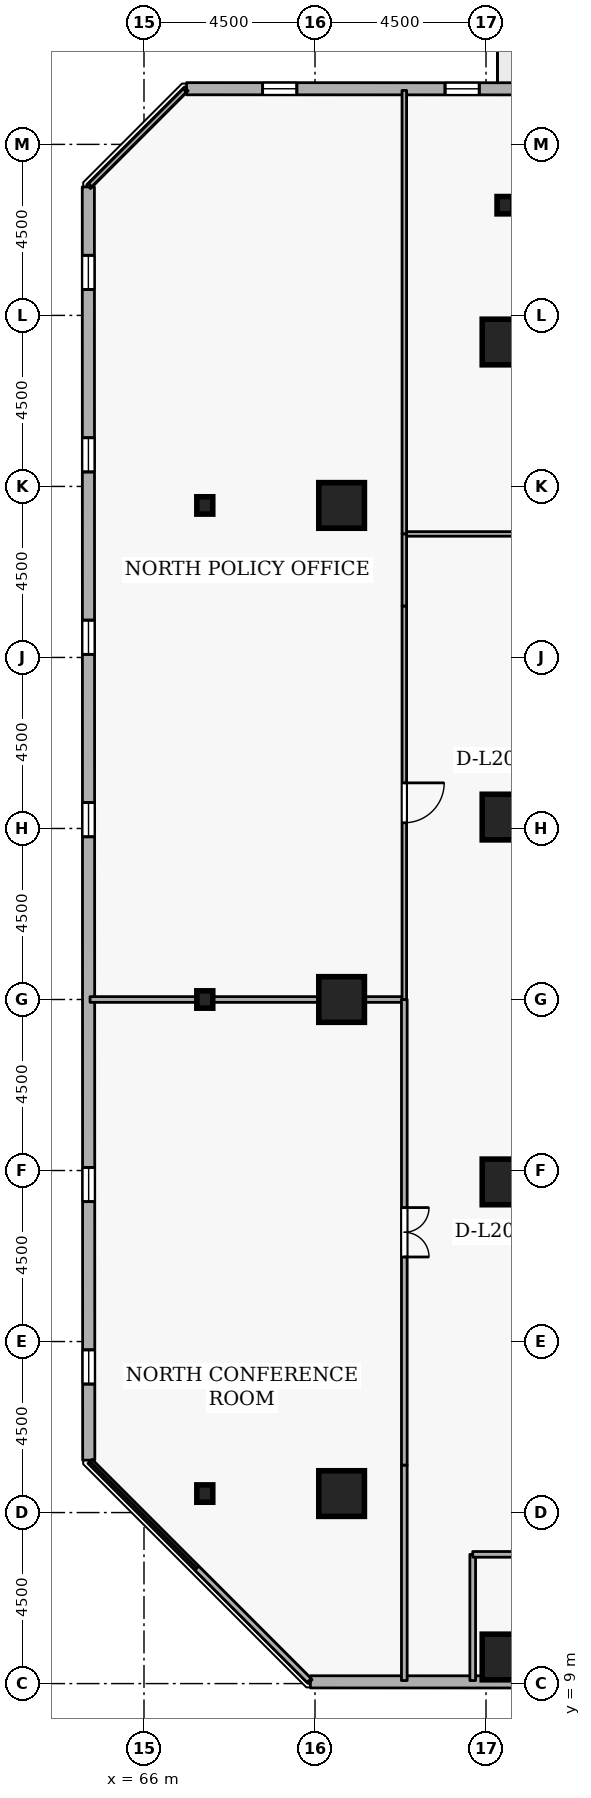
"""IFC4 building model, lengths in metres.
Left out: names, types, materials, properties, quantities, classifications, styles, units other than length and angle.
Written with IfcOpenShell. Run it as: python <this file> out.ifc"""

import sys

from ifc_helpers import new_model, si_unit, direction, frame, frame_2d, origin, origin_2d, place, context, subcontext, project, spatial, rectangle, i_section, extrude, element, fill, save


model = new_model("IFC4")
c1 = context("Model", 3, precision=1e-05, world=origin(), true_north=direction((0.0, 1.0)))
c2 = subcontext(c1, "Body", "Model", "MODEL_VIEW")
j1 = project(units=[si_unit("LENGTHUNIT", "METRE"), si_unit("PLANEANGLEUNIT", "RADIAN")], contexts=[c1])
p1 = place(None, origin())
s1 = spatial("IfcSite", under=j1, at=p1, CompositionType="ELEMENT")
p2 = place(p1, origin())
s2 = spatial("IfcBuilding", under=s1, at=p2, CompositionType="ELEMENT")
p3 = place(p2, frame((0.0, 0.0, 80.1)))
s3 = spatial("IfcBuildingStorey", under=s2, at=p3, CompositionType="ELEMENT", Elevation=80.1)
for number, where, z_axis, x_axis in (
    (1, (75.5, 44.3, 0.0), (0.0, 0.0, 1.0), (1.0, 0.0, 0.0)),
    (2, (71.2, 14.0, 0.0), (0.0, 0.0, 1.0), (1.0, 0.0, 0.0)),
    (3, (71.2, 27.0, 0.0), (0.0, 0.0, 1.0), (1.0, 0.0, 0.0)),
    (4, (71.2, 40.0, 0.0), (0.0, 0.0, 1.0), (1.0, 0.0, 0.0)),
    (5, (75.5, 9.7, 0.0), (0.0, 0.0, 1.0), (1.0, 0.0, 0.0)),
    (6, (75.5, 22.2, 0.0), (0.0, 0.0, 1.0), (1.0, 0.0, 0.0)),
    (7, (75.5, 31.8, 0.0), (0.0, 0.0, 1.0), (1.0, 0.0, 0.0)),
):
    element("IfcColumn", number, at=place(p3, frame(where, z_axis=z_axis, x_axis=x_axis)), inside=s3, PredefinedType="COLUMN", context=c2, shape_type="SweptSolid", body=[
        extrude(rectangle(XDim=1.2, YDim=1.2, at=origin_2d()), origin(), (0.0, 0.0, 1.0), 3.6),
    ])
for number, where, z_axis, x_axis in (
    (8, (75.5, 47.9, 0.0), (0.0, 0.0, 1.0), (1.0, 0.0, 0.0)),
    (9, (67.6, 14.0, 0.0), (0.0, 0.0, 1.0), (1.0, 0.0, 0.0)),
    (10, (67.6, 27.0, 0.0), (0.0, 0.0, 1.0), (1.0, 0.0, 0.0)),
    (11, (67.6, 40.0, 0.0), (0.0, 0.0, 1.0), (1.0, 0.0, 0.0)),
):
    element("IfcColumn", number, at=place(p3, frame(where, z_axis=z_axis, x_axis=x_axis)), inside=s3, PredefinedType="COLUMN", context=c2, shape_type="SweptSolid", body=[
        extrude(i_section(OverallWidth=0.418, OverallDepth=0.456, WebThickness=0.042, FlangeThickness=0.067, FilletRadius=0.015, at=origin_2d()), origin(), (0.0, 0.0, 1.0), 3.6),
    ])
p4 = place(p3, frame((70.378, 9.046, 0.0), z_axis=(0.0, 0.0, 1.0), x_axis=(0.999999950907, -0.000313347115, 0.0)))
e12 = element("IfcWall", 12, at=p4, inside=s3, PredefinedType="STANDARD", context=c2, shape_type="SweptSolid", body=[
    extrude(rectangle(XDim=33.503, YDim=0.32, at=frame_2d((16.751, 0.0))), origin(), (0.0, 0.0, 1.0), 2.7),
])
p5 = place(p4, frame((6.6, 0.0, 0.72)))
e13 = element("IfcOpeningElement", 13, at=p5, cuts=e12, PredefinedType="OPENING", context=c2, shape_type="SweptSolid", body=[
    extrude(rectangle(XDim=0.9, YDim=1.75, at=frame_2d((0.45, 0.875))), frame((0.0, 0.17, 0.0), z_axis=(0.0, -1.0, 0.0), x_axis=(1.0, 0.0, 0.0)), (0.0, 0.0, 1.0), 0.34),
])
p6 = place(p4, frame((11.4, 0.0, 0.72)))
e14 = element("IfcOpeningElement", 14, at=p6, cuts=e12, PredefinedType="OPENING", context=c2, shape_type="SweptSolid", body=[
    extrude(rectangle(XDim=0.9, YDim=1.75, at=frame_2d((0.45, 0.875))), frame((0.0, 0.17, 0.0), z_axis=(0.0, -1.0, 0.0), x_axis=(1.0, 0.0, 0.0)), (0.0, 0.0, 1.0), 0.34),
])
p7 = place(p4, frame((21.0, 0.0, 0.72)))
e15 = element("IfcOpeningElement", 15, at=p7, cuts=e12, PredefinedType="OPENING", context=c2, shape_type="SweptSolid", body=[
    extrude(rectangle(XDim=0.9, YDim=1.75, at=frame_2d((0.45, 0.875))), frame((0.0, 0.17, 0.0), z_axis=(0.0, -1.0, 0.0), x_axis=(1.0, 0.0, 0.0)), (0.0, 0.0, 1.0), 0.34),
])
p8 = place(p4, frame((25.8, 0.0, 0.72)))
e16 = element("IfcOpeningElement", 16, at=p8, cuts=e12, PredefinedType="OPENING", context=c2, shape_type="SweptSolid", body=[
    extrude(rectangle(XDim=0.9, YDim=1.75, at=frame_2d((0.45, 0.875))), frame((0.0, 0.17, 0.0), z_axis=(0.0, -1.0, 0.0), x_axis=(1.0, 0.0, 0.0)), (0.0, 0.0, 1.0), 0.34),
])
p9 = place(p3, frame((100.622, 50.954, 0.0), z_axis=(0.0, 0.0, 1.0), x_axis=(-0.999999950907, 0.000313347115, 0.0)))
e17 = element("IfcWall", 17, at=p9, inside=s3, PredefinedType="STANDARD", context=c2, shape_type="SweptSolid", body=[
    extrude(rectangle(XDim=33.503, YDim=0.32, at=frame_2d((16.751, 0.0))), origin(), (0.0, 0.0, 1.0), 2.7),
])
p10 = place(p9, frame((18.552, 0.0, 0.0)))
e18 = element("IfcOpeningElement", 18, at=p10, cuts=e17, PredefinedType="OPENING", context=c2, shape_type="SweptSolid", body=[
    extrude(rectangle(XDim=1.0, YDim=2.08, at=frame_2d((0.5, 1.04))), frame((0.0, 0.17, 0.0), z_axis=(0.0, -1.0, 0.0), x_axis=(1.0, 0.0, 0.0)), (0.0, 0.0, 1.0), 0.34),
])
p11 = place(p9, frame((1.8, 0.0, 0.72)))
e19 = element("IfcOpeningElement", 19, at=p11, cuts=e17, PredefinedType="OPENING", context=c2, shape_type="SweptSolid", body=[
    extrude(rectangle(XDim=0.9, YDim=1.75, at=frame_2d((0.45, 0.875))), frame((0.0, 0.17, 0.0), z_axis=(0.0, -1.0, 0.0), x_axis=(1.0, 0.0, 0.0)), (0.0, 0.0, 1.0), 0.34),
])
p12 = place(p9, frame((6.6, 0.0, 0.72)))
e20 = element("IfcOpeningElement", 20, at=p12, cuts=e17, PredefinedType="OPENING", context=c2, shape_type="SweptSolid", body=[
    extrude(rectangle(XDim=0.9, YDim=1.75, at=frame_2d((0.45, 0.875))), frame((0.0, 0.17, 0.0), z_axis=(0.0, -1.0, 0.0), x_axis=(1.0, 0.0, 0.0)), (0.0, 0.0, 1.0), 0.34),
])
p13 = place(p9, frame((16.2, 0.0, 0.72)))
e21 = element("IfcOpeningElement", 21, at=p13, cuts=e17, PredefinedType="OPENING", context=c2, shape_type="SweptSolid", body=[
    extrude(rectangle(XDim=0.9, YDim=1.75, at=frame_2d((0.45, 0.875))), frame((0.0, 0.17, 0.0), z_axis=(0.0, -1.0, 0.0), x_axis=(1.0, 0.0, 0.0)), (0.0, 0.0, 1.0), 0.34),
])
p14 = place(p9, frame((21.0, 0.0, 0.72)))
e22 = element("IfcOpeningElement", 22, at=p14, cuts=e17, PredefinedType="OPENING", context=c2, shape_type="SweptSolid", body=[
    extrude(rectangle(XDim=0.9, YDim=1.75, at=frame_2d((0.45, 0.875))), frame((0.0, 0.17, 0.0), z_axis=(0.0, -1.0, 0.0), x_axis=(1.0, 0.0, 0.0)), (0.0, 0.0, 1.0), 0.34),
])
p15 = place(p9, frame((25.8, 0.0, 0.72)))
e23 = element("IfcOpeningElement", 23, at=p15, cuts=e17, PredefinedType="OPENING", context=c2, shape_type="SweptSolid", body=[
    extrude(rectangle(XDim=0.9, YDim=1.75, at=frame_2d((0.45, 0.875))), frame((0.0, 0.17, 0.0), z_axis=(0.0, -1.0, 0.0), x_axis=(1.0, 0.0, 0.0)), (0.0, 0.0, 1.0), 0.34),
])
p16 = place(p9, frame((30.6, 0.0, 0.72)))
e24 = element("IfcOpeningElement", 24, at=p16, cuts=e17, PredefinedType="OPENING", context=c2, shape_type="SweptSolid", body=[
    extrude(rectangle(XDim=0.9, YDim=1.75, at=frame_2d((0.45, 0.875))), frame((0.0, 0.17, 0.0), z_axis=(0.0, -1.0, 0.0), x_axis=(1.0, 0.0, 0.0)), (0.0, 0.0, 1.0), 0.34),
])
p17 = place(p3, frame((64.535, 48.381, 0.0), z_axis=(0.0, 0.0, 1.0), x_axis=(0.000313347115, -0.999999950907, 0.0)))
e25 = element("IfcWall", 25, at=p17, inside=s3, PredefinedType="STANDARD", context=c2, shape_type="SweptSolid", body=[
    extrude(rectangle(XDim=33.503, YDim=0.32, at=frame_2d((16.751, 0.0))), origin(), (0.0, 0.0, 1.0), 2.7),
])
p18 = place(p17, frame((1.8, 0.0, 0.72)))
e26 = element("IfcOpeningElement", 26, at=p18, cuts=e25, PredefinedType="OPENING", context=c2, shape_type="SweptSolid", body=[
    extrude(rectangle(XDim=0.9, YDim=1.75, at=frame_2d((0.45, 0.875))), frame((0.0, 0.17, 0.0), z_axis=(0.0, -1.0, 0.0), x_axis=(1.0, 0.0, 0.0)), (0.0, 0.0, 1.0), 0.34),
])
p19 = place(p17, frame((6.6, 0.0, 0.72)))
e27 = element("IfcOpeningElement", 27, at=p19, cuts=e25, PredefinedType="OPENING", context=c2, shape_type="SweptSolid", body=[
    extrude(rectangle(XDim=0.9, YDim=1.75, at=frame_2d((0.45, 0.875))), frame((0.0, 0.17, 0.0), z_axis=(0.0, -1.0, 0.0), x_axis=(1.0, 0.0, 0.0)), (0.0, 0.0, 1.0), 0.34),
])
p20 = place(p17, frame((11.4, 0.0, 0.72)))
e28 = element("IfcOpeningElement", 28, at=p20, cuts=e25, PredefinedType="OPENING", context=c2, shape_type="SweptSolid", body=[
    extrude(rectangle(XDim=0.9, YDim=1.75, at=frame_2d((0.45, 0.875))), frame((0.0, 0.17, 0.0), z_axis=(0.0, -1.0, 0.0), x_axis=(1.0, 0.0, 0.0)), (0.0, 0.0, 1.0), 0.34),
])
p21 = place(p17, frame((16.2, 0.0, 0.72)))
e29 = element("IfcOpeningElement", 29, at=p21, cuts=e25, PredefinedType="OPENING", context=c2, shape_type="SweptSolid", body=[
    extrude(rectangle(XDim=0.9, YDim=1.75, at=frame_2d((0.45, 0.875))), frame((0.0, 0.17, 0.0), z_axis=(0.0, -1.0, 0.0), x_axis=(1.0, 0.0, 0.0)), (0.0, 0.0, 1.0), 0.34),
])
p22 = place(p17, frame((25.8, 0.0, 0.72)))
e30 = element("IfcOpeningElement", 30, at=p22, cuts=e25, PredefinedType="OPENING", context=c2, shape_type="SweptSolid", body=[
    extrude(rectangle(XDim=0.9, YDim=1.75, at=frame_2d((0.45, 0.875))), frame((0.0, 0.17, 0.0), z_axis=(0.0, -1.0, 0.0), x_axis=(1.0, 0.0, 0.0)), (0.0, 0.0, 1.0), 0.34),
])
p23 = place(p17, frame((30.6, 0.0, 0.72)))
e31 = element("IfcOpeningElement", 31, at=p23, cuts=e25, PredefinedType="OPENING", context=c2, shape_type="SweptSolid", body=[
    extrude(rectangle(XDim=0.9, YDim=1.75, at=frame_2d((0.45, 0.875))), frame((0.0, 0.17, 0.0), z_axis=(0.0, -1.0, 0.0), x_axis=(1.0, 0.0, 0.0)), (0.0, 0.0, 1.0), 0.34),
])
p24 = place(p3, frame((74.65, 9.08, 0.0), z_axis=(0.0, 0.0, 1.0), x_axis=(0.0, 1.0, 0.0)))
e32 = element("IfcWall", 32, at=p24, inside=s3, PredefinedType="PARTITIONING", context=c2, shape_type="SweptSolid", body=[
    extrude(rectangle(XDim=3.32, YDim=0.15, at=frame_2d((1.66, 0.0))), origin(), (0.0, 0.0, 1.0), 3.34),
])
p25 = place(p3, frame((74.65, 12.4, 0.0), z_axis=(0.0, 0.0, 1.0), x_axis=(1.0, 0.0, 0.0)))
e33 = element("IfcWall", 33, at=p25, inside=s3, PredefinedType="PARTITIONING", context=c2, shape_type="SweptSolid", body=[
    extrude(rectangle(XDim=4.802, YDim=0.15, at=frame_2d((2.401, 0.0))), origin(), (0.0, 0.0, 1.0), 3.34),
])
p26 = place(p3, frame((82.2, 39.25, 0.0), z_axis=(0.0, 0.0, 1.0), x_axis=(-1.0, 0.0, 0.0)))
e34 = element("IfcWall", 34, at=p26, inside=s3, PredefinedType="PARTITIONING", context=c2, shape_type="SweptSolid", body=[
    extrude(rectangle(XDim=9.35, YDim=0.12, at=frame_2d((4.675, 0.0))), origin(), (0.0, 0.0, 1.0), 3.34),
])
p27 = place(p26, frame((4.15, 0.0, 0.0)))
e35 = element("IfcOpeningElement", 35, at=p27, cuts=e34, PredefinedType="OPENING", context=c2, shape_type="SweptSolid", body=[
    extrude(rectangle(XDim=1.05, YDim=2.1, at=frame_2d((0.525, 1.05))), frame((0.0, 0.07, 0.0), z_axis=(0.0, -1.0, 0.0), x_axis=(1.0, 0.0, 0.0)), (0.0, 0.0, 1.0), 0.14),
])
p28 = place(p3, frame((72.85, 39.25, 0.0), z_axis=(0.0, 0.0, 1.0), x_axis=(0.0, 1.0, 0.0)))
e36 = element("IfcWall", 36, at=p28, inside=s3, PredefinedType="PARTITIONING", context=c2, shape_type="SweptSolid", body=[
    extrude(rectangle(XDim=11.67, YDim=0.12, at=frame_2d((5.835, 0.0))), origin(), (0.0, 0.0, 1.0), 3.34),
])
p29 = place(p3, frame((72.85, 14.75, 0.0), z_axis=(0.0, 0.0, 1.0), x_axis=(0.0, -1.0, 0.0)))
e37 = element("IfcWall", 37, at=p29, inside=s3, PredefinedType="PARTITIONING", context=c2, shape_type="SweptSolid", body=[
    extrude(rectangle(XDim=5.67, YDim=0.15, at=frame_2d((2.835, 0.0))), origin(), (0.0, 0.0, 1.0), 3.34),
])
p30 = place(p3, frame((70.348, 9.08, 0.0), z_axis=(0.0, 0.0, 1.0), x_axis=(-0.707106781187, 0.707106781187, 0.0)))
e38 = element("IfcWall", 38, at=p30, inside=s3, PredefinedType="PARTITIONING", context=c2, shape_type="SweptSolid", body=[
    extrude(rectangle(XDim=8.156, YDim=0.15, at=frame_2d((4.078, 0.0))), origin(), (0.0, 0.0, 1.0), 3.34),
])
p31 = place(p3, frame((64.58, 27.0, 0.0), z_axis=(0.0, 0.0, 1.0), x_axis=(1.0, 0.0, 0.0)))
e39 = element("IfcWall", 39, at=p31, inside=s3, PredefinedType="PARTITIONING", context=c2, shape_type="SweptSolid", body=[
    extrude(rectangle(XDim=8.27, YDim=0.15, at=frame_2d((4.135, 0.0))), origin(), (0.0, 0.0, 1.0), 2.882),
])
p32 = place(p3, frame((72.85, 27.0, 0.0), z_axis=(0.0, 0.0, 1.0), x_axis=(0.0, -1.0, 0.0)))
e40 = element("IfcWall", 40, at=p32, inside=s3, PredefinedType="PARTITIONING", context=c2, shape_type="SweptSolid", body=[
    extrude(rectangle(XDim=12.25, YDim=0.15, at=frame_2d((6.125, 0.0))), origin(), (0.0, 0.0, 1.0), 3.34),
])
p33 = place(p32, frame((5.475, 0.0, 0.0)))
e41 = element("IfcOpeningElement", 41, at=p33, cuts=e40, PredefinedType="OPENING", context=c2, shape_type="SweptSolid", body=[
    extrude(rectangle(XDim=1.3, YDim=2.12, at=frame_2d((0.65, 1.06))), frame((0.0, 0.085, 0.0), z_axis=(0.0, -1.0, 0.0), x_axis=(1.0, 0.0, 0.0)), (0.0, 0.0, 1.0), 0.17),
])
p34 = place(p3, frame((64.58, 48.425, 0.0), z_axis=(0.0, 0.0, 1.0), x_axis=(0.707106781187, 0.707106781187, 0.0)))
e42 = element("IfcWall", 42, at=p34, inside=s3, PredefinedType="PARTITIONING", context=c2, shape_type="SweptSolid", body=[
    extrude(rectangle(XDim=3.528, YDim=0.12, at=frame_2d((1.764, 0.0))), origin(), (0.0, 0.0, 1.0), 3.34),
])
p35 = place(p3, frame((72.85, 39.25, 0.0), z_axis=(0.0, 0.0, 1.0), x_axis=(0.0, -1.0, 0.0)))
e43 = element("IfcWall", 43, at=p35, inside=s3, PredefinedType="PARTITIONING", context=c2, shape_type="SweptSolid", body=[
    extrude(rectangle(XDim=1.9, YDim=0.12, at=frame_2d((0.95, 0.0))), origin(), (0.0, 0.0, 1.0), 2.895),
])
p36 = place(p3, frame((72.85, 37.35, 0.0), z_axis=(0.0, 0.0, 1.0), x_axis=(0.0, -1.0, 0.0)))
e44 = element("IfcWall", 44, at=p36, inside=s3, PredefinedType="PARTITIONING", context=c2, shape_type="SweptSolid", body=[
    extrude(rectangle(XDim=10.35, YDim=0.12, at=frame_2d((5.175, 0.0))), origin(), (0.0, 0.0, 1.0), 2.895),
])
p37 = place(p36, frame((4.65, 0.0, 0.0)))
e45 = element("IfcOpeningElement", 45, at=p37, cuts=e44, PredefinedType="OPENING", context=c2, shape_type="SweptSolid", body=[
    extrude(rectangle(XDim=1.05, YDim=2.1, at=frame_2d((0.525, 1.05))), frame((0.0, 0.07, 0.0), z_axis=(0.0, -1.0, 0.0), x_axis=(1.0, 0.0, 0.0)), (0.0, 0.0, 1.0), 0.14),
])
p38 = place(p15, origin())
e46 = element("IfcWindow", 46, at=p38, inside=s3, PartitioningType="SINGLE_PANEL", PredefinedType="WINDOW", context=c2, shape_type="SweptSolid", body=[
    extrude(rectangle(XDim=0.9, YDim=1.75, at=frame_2d((0.45, 0.875))), frame((0.0, 0.03, 0.0), z_axis=(0.0, -1.0, 0.0), x_axis=(1.0, 0.0, 0.0)), (0.0, 0.0, 1.0), 0.06),
])
fill(e23, e46)
p39 = place(p16, origin())
e47 = element("IfcWindow", 47, at=p39, inside=s3, PartitioningType="SINGLE_PANEL", PredefinedType="WINDOW", context=c2, shape_type="SweptSolid", body=[
    extrude(rectangle(XDim=0.9, YDim=1.75, at=frame_2d((0.45, 0.875))), frame((0.0, 0.03, 0.0), z_axis=(0.0, -1.0, 0.0), x_axis=(1.0, 0.0, 0.0)), (0.0, 0.0, 1.0), 0.06),
])
fill(e24, e47)
p40 = place(p18, origin())
e48 = element("IfcWindow", 48, at=p40, inside=s3, PartitioningType="SINGLE_PANEL", PredefinedType="WINDOW", context=c2, shape_type="SweptSolid", body=[
    extrude(rectangle(XDim=0.9, YDim=1.75, at=frame_2d((0.45, 0.875))), frame((0.0, 0.03, 0.0), z_axis=(0.0, -1.0, 0.0), x_axis=(1.0, 0.0, 0.0)), (0.0, 0.0, 1.0), 0.06),
])
fill(e26, e48)
p41 = place(p19, origin())
e49 = element("IfcWindow", 49, at=p41, inside=s3, PartitioningType="SINGLE_PANEL", PredefinedType="WINDOW", context=c2, shape_type="SweptSolid", body=[
    extrude(rectangle(XDim=0.9, YDim=1.75, at=frame_2d((0.45, 0.875))), frame((0.0, 0.03, 0.0), z_axis=(0.0, -1.0, 0.0), x_axis=(1.0, 0.0, 0.0)), (0.0, 0.0, 1.0), 0.06),
])
fill(e27, e49)
p42 = place(p20, origin())
e50 = element("IfcWindow", 50, at=p42, inside=s3, PartitioningType="SINGLE_PANEL", PredefinedType="WINDOW", context=c2, shape_type="SweptSolid", body=[
    extrude(rectangle(XDim=0.9, YDim=1.75, at=frame_2d((0.45, 0.875))), frame((0.0, 0.03, 0.0), z_axis=(0.0, -1.0, 0.0), x_axis=(1.0, 0.0, 0.0)), (0.0, 0.0, 1.0), 0.06),
])
fill(e28, e50)
p43 = place(p21, origin())
e51 = element("IfcWindow", 51, at=p43, inside=s3, PartitioningType="SINGLE_PANEL", PredefinedType="WINDOW", context=c2, shape_type="SweptSolid", body=[
    extrude(rectangle(XDim=0.9, YDim=1.75, at=frame_2d((0.45, 0.875))), frame((0.0, 0.03, 0.0), z_axis=(0.0, -1.0, 0.0), x_axis=(1.0, 0.0, 0.0)), (0.0, 0.0, 1.0), 0.06),
])
fill(e29, e51)
p44 = place(p22, origin())
e52 = element("IfcWindow", 52, at=p44, inside=s3, PartitioningType="SINGLE_PANEL", PredefinedType="WINDOW", context=c2, shape_type="SweptSolid", body=[
    extrude(rectangle(XDim=0.9, YDim=1.75, at=frame_2d((0.45, 0.875))), frame((0.0, 0.03, 0.0), z_axis=(0.0, -1.0, 0.0), x_axis=(1.0, 0.0, 0.0)), (0.0, 0.0, 1.0), 0.06),
])
fill(e30, e52)
p45 = place(p23, origin())
e53 = element("IfcWindow", 53, at=p45, inside=s3, PartitioningType="SINGLE_PANEL", PredefinedType="WINDOW", context=c2, shape_type="SweptSolid", body=[
    extrude(rectangle(XDim=0.9, YDim=1.75, at=frame_2d((0.45, 0.875))), frame((0.0, 0.03, 0.0), z_axis=(0.0, -1.0, 0.0), x_axis=(1.0, 0.0, 0.0)), (0.0, 0.0, 1.0), 0.06),
])
fill(e31, e53)
p46 = place(p33, origin())
e54 = element("IfcDoor", 54, at=p46, inside=s3, OperationType="DOUBLE_DOOR_SINGLE_SWING", PredefinedType="DOOR", context=c2, shape_type="SweptSolid", body=[
    extrude(rectangle(XDim=1.3, YDim=2.12, at=frame_2d((0.65, 1.06))), frame((0.0, 0.025, 0.0), z_axis=(0.0, -1.0, 0.0), x_axis=(1.0, 0.0, 0.0)), (0.0, 0.0, 1.0), 0.05),
])
fill(e41, e54)
p47 = place(p37, origin())
e55 = element("IfcDoor", 55, at=p47, inside=s3, OperationType="SINGLE_SWING_LEFT", PredefinedType="DOOR", context=c2, shape_type="SweptSolid", body=[
    extrude(rectangle(XDim=1.05, YDim=2.1, at=frame_2d((0.525, 1.05))), frame((0.0, 0.025, 0.0), z_axis=(0.0, -1.0, 0.0), x_axis=(1.0, 0.0, 0.0)), (0.0, 0.0, 1.0), 0.05),
])
fill(e45, e55)
save(model, sys.argv[1])
